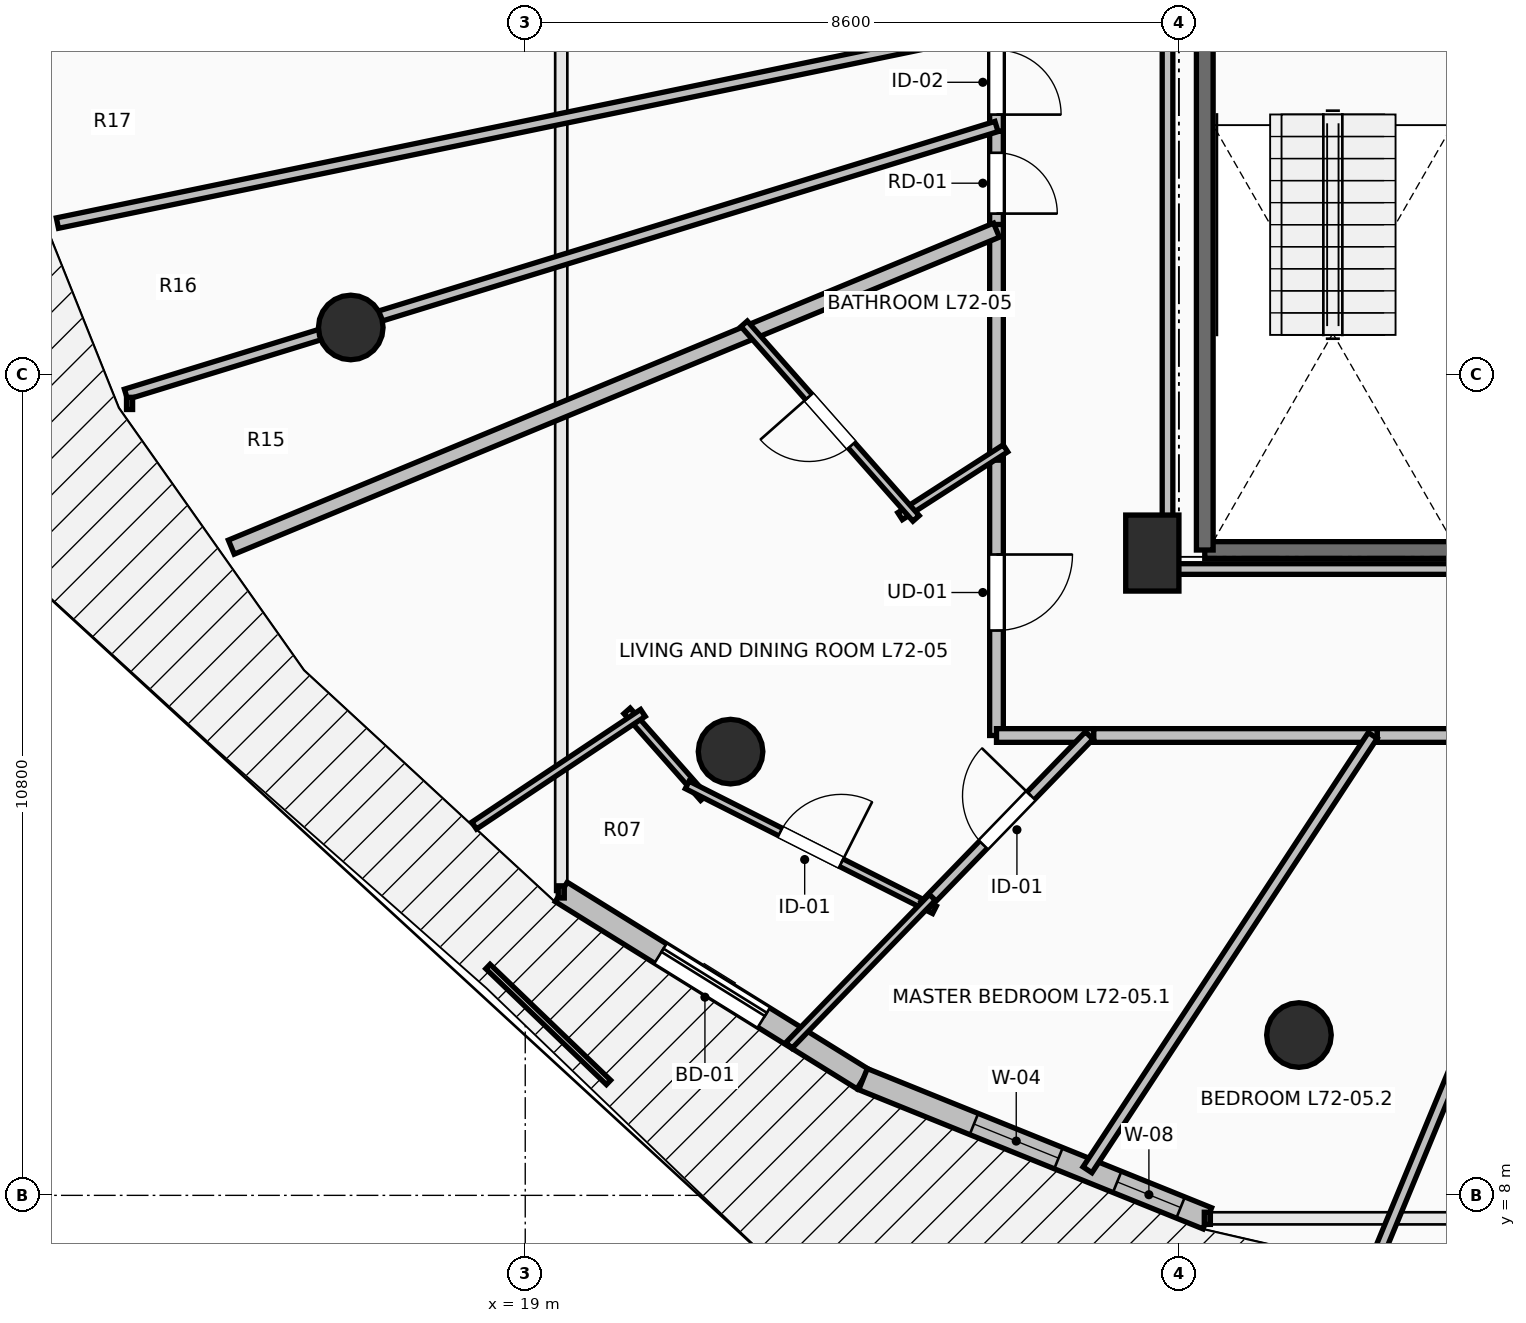
"""IFC4 building model, lengths in metres.
Left out: names, types, materials, properties, quantities, classifications, styles, units other than length and angle.
Written with IfcOpenShell. Run it as: python <this file> out.ifc"""

import sys

from ifc_helpers import new_model, si_unit, direction, frame, frame_2d, origin, origin_2d, place, context, subcontext, project, spatial, rectangle, circle, extrude, element, fill, save


model = new_model("IFC4")
c1 = context("Model", 3, precision=1e-05, world=origin(), true_north=direction((0.0, 1.0)))
c2 = subcontext(c1, "Body", "Model", "MODEL_VIEW")
j1 = project(units=[si_unit("LENGTHUNIT", "METRE"), si_unit("PLANEANGLEUNIT", "RADIAN")], contexts=[c1])
p1 = place(None, origin())
s1 = spatial("IfcSite", under=j1, at=p1, CompositionType="ELEMENT")
p2 = place(p1, origin())
s2 = spatial("IfcBuilding", under=s1, at=p2, CompositionType="ELEMENT")
p3 = place(p2, frame((0.0, 0.0, 266.2)))
s3 = spatial("IfcBuildingStorey", under=s2, at=p3, CompositionType="ELEMENT", Elevation=266.2)
for number, where, z_axis, x_axis in (
    (1, (16.705, 19.418, 0.0), (0.0, 0.0, 1.0), (-0.924, -0.383, 0.0)),
    (2, (21.701, 13.838, 0.0), (0.0, 0.0, 1.0), (-0.707, -0.707, 0.0)),
    (3, (29.179, 10.109, 0.0), (0.0, 0.0, 1.0), (-0.383, -0.924, 0.0)),
):
    element("IfcColumn", number, at=place(p3, frame(where, z_axis=z_axis, x_axis=x_axis)), inside=s3, PredefinedType="COLUMN", context=c2, shape_type="SweptSolid", body=[
        extrude(circle(Radius=0.425, at=origin_2d()), origin(), (0.0, 0.0, 1.0), 3.55),
    ])
p4 = place(p3, frame((27.25, 16.45, 0.0), z_axis=(0.0, 0.0, 1.0), x_axis=(1.0, 0.0, 0.0)))
e4 = element("IfcColumn", 4, at=p4, inside=s3, PredefinedType="PILASTER", context=c2, shape_type="SweptSolid", body=[
    extrude(rectangle(XDim=0.7, YDim=1.0, at=origin_2d()), origin(), (0.0, 0.0, 1.0), 3.55),
])
p5 = place(p3, frame((19.474, 11.992, 0.0), z_axis=(0.0, 0.0, 1.0), x_axis=(0.849702323036, -0.527262707032, 0.0)))
e5 = element("IfcWall", 5, at=p5, inside=s3, PredefinedType="STANDARD", context=c2, shape_type="SweptSolid", body=[
    extrude(rectangle(XDim=4.672, YDim=0.3, at=frame_2d((2.336, 0.0))), origin(), (0.0, 0.0, 1.0), 3.29),
])
p6 = place(p5, frame((1.536, 0.0, 0.0)))
e6 = element("IfcOpeningElement", 6, at=p6, cuts=e5, PredefinedType="OPENING", context=c2, shape_type="SweptSolid", body=[
    extrude(rectangle(XDim=1.6, YDim=2.3, at=frame_2d((0.8, 1.15))), frame((0.0, 0.165, 0.0), z_axis=(0.0, -1.0, 0.0), x_axis=(1.0, 0.0, 0.0)), (0.0, 0.0, 1.0), 0.33),
])
p7 = place(p3, frame((23.444, 9.529, 0.0), z_axis=(0.0, 0.0, 1.0), x_axis=(0.927147375511, -0.374696869594, 0.0)))
e7 = element("IfcWall", 7, at=p7, inside=s3, PredefinedType="STANDARD", context=c2, shape_type="SweptSolid", body=[
    extrude(rectangle(XDim=4.885, YDim=0.3, at=frame_2d((2.443, 0.0))), origin(), (0.0, 0.0, 1.0), 3.29),
])
p8 = place(p7, frame((1.574, 0.0, 0.85)))
e8 = element("IfcOpeningElement", 8, at=p8, cuts=e7, PredefinedType="OPENING", context=c2, shape_type="SweptSolid", body=[
    extrude(rectangle(XDim=1.2, YDim=1.95, at=frame_2d((0.6, 0.975))), frame((0.0, 0.165, 0.0), z_axis=(0.0, -1.0, 0.0), x_axis=(1.0, 0.0, 0.0)), (0.0, 0.0, 1.0), 0.33),
])
p9 = place(p7, frame((3.606, 0.0, 0.85)))
e9 = element("IfcOpeningElement", 9, at=p9, cuts=e7, PredefinedType="OPENING", context=c2, shape_type="SweptSolid", body=[
    extrude(rectangle(XDim=0.9, YDim=1.8, at=frame_2d((0.45, 0.9))), frame((0.0, 0.165, 0.0), z_axis=(0.0, -1.0, 0.0), x_axis=(1.0, 0.0, 0.0)), (0.0, 0.0, 1.0), 0.33),
])
p10 = place(p3, frame((31.31, 16.49, 0.0), z_axis=(0.0, 0.0, 1.0), x_axis=(-1.0, 0.0, 0.0)))
e10 = element("IfcWall", 10, at=p10, inside=s3, PredefinedType="SOLIDWALL", context=c2, shape_type="SweptSolid", body=[
    extrude(rectangle(XDim=3.37, YDim=0.22, at=frame_2d((1.685, 0.0))), origin(), (0.0, 0.0, 1.0), 3.29),
])
p11 = place(p3, frame((27.94, 16.49, 0.0), z_axis=(0.0, 0.0, 1.0), x_axis=(0.0, 1.0, 0.0)))
e11 = element("IfcWall", 11, at=p11, inside=s3, PredefinedType="SOLIDWALL", context=c2, shape_type="SweptSolid", body=[
    extrude(rectangle(XDim=7.42, YDim=0.22, at=frame_2d((3.71, 0.0))), origin(), (0.0, 0.0, 1.0), 3.29),
])
p12 = place(p3, frame((25.2, 23.288, 0.0), z_axis=(0.0, 0.0, 1.0), x_axis=(0.0, -1.0, 0.0)))
e12 = element("IfcWall", 12, at=p12, inside=s3, PredefinedType="PARTITIONING", context=c2, shape_type="SweptSolid", body=[
    extrude(rectangle(XDim=1.289, YDim=0.18, at=frame_2d((0.645, 0.0))), origin(), (0.0, 0.0, 1.0), 3.29),
])
p13 = place(p12, frame((0.219, 0.0, 0.0)))
e13 = element("IfcOpeningElement", 13, at=p13, cuts=e12, PredefinedType="OPENING", context=c2, shape_type="SweptSolid", body=[
    extrude(rectangle(XDim=0.85, YDim=2.1, at=frame_2d((0.425, 1.05))), frame((0.0, 0.105, 0.0), z_axis=(0.0, -1.0, 0.0), x_axis=(1.0, 0.0, 0.0)), (0.0, 0.0, 1.0), 0.21),
])
p14 = place(p3, frame((25.2, 21.999, 0.0), z_axis=(0.0, 0.0, 1.0), x_axis=(0.0, -1.0, 0.0)))
e14 = element("IfcWall", 14, at=p14, inside=s3, PredefinedType="PARTITIONING", context=c2, shape_type="SweptSolid", body=[
    extrude(rectangle(XDim=1.366, YDim=0.18, at=frame_2d((0.683, 0.0))), origin(), (0.0, 0.0, 1.0), 3.29),
])
p15 = place(p14, frame((0.283, 0.0, 0.0)))
e15 = element("IfcOpeningElement", 15, at=p15, cuts=e14, PredefinedType="OPENING", context=c2, shape_type="SweptSolid", body=[
    extrude(rectangle(XDim=0.8, YDim=2.05, at=frame_2d((0.4, 1.025))), frame((0.0, 0.105, 0.0), z_axis=(0.0, -1.0, 0.0), x_axis=(1.0, 0.0, 0.0)), (0.0, 0.0, 1.0), 0.21),
])
p16 = place(p3, frame((25.2, 17.812, 0.0), z_axis=(0.0, 0.0, 1.0), x_axis=(0.0, -1.0, 0.0)))
e16 = element("IfcWall", 16, at=p16, inside=s3, PredefinedType="PARTITIONING", context=c2, shape_type="SweptSolid", body=[
    extrude(rectangle(XDim=3.762, YDim=0.18, at=frame_2d((1.881, 0.0))), origin(), (0.0, 0.0, 1.0), 2.482),
])
p17 = place(p16, frame((1.381, 0.0, 0.0)))
e17 = element("IfcOpeningElement", 17, at=p17, cuts=e16, PredefinedType="OPENING", context=c2, shape_type="SweptSolid", body=[
    extrude(rectangle(XDim=1.0, YDim=2.15, at=frame_2d((0.5, 1.075))), frame((0.0, 0.105, 0.0), z_axis=(0.0, -1.0, 0.0), x_axis=(1.0, 0.0, 0.0)), (0.0, 0.0, 1.0), 0.21),
])
p18 = place(p3, frame((25.2, 14.05, 0.0), z_axis=(0.0, 0.0, 1.0), x_axis=(1.0, 0.0, 0.0)))
e18 = element("IfcWall", 18, at=p18, inside=s3, PredefinedType="PARTITIONING", context=c2, shape_type="SweptSolid", body=[
    extrude(rectangle(XDim=1.28, YDim=0.18, at=frame_2d((0.64, 0.0))), origin(), (0.0, 0.0, 1.0), 2.936),
])
p19 = place(p3, frame((25.2, 20.773, 0.0), z_axis=(0.0, 0.0, 1.0), x_axis=(0.0, -1.0, 0.0)))
e19 = element("IfcWall", 19, at=p19, inside=s3, PredefinedType="PARTITIONING", context=c2, shape_type="SweptSolid", body=[
    extrude(rectangle(XDim=3.101, YDim=0.18, at=frame_2d((1.55, 0.0))), origin(), (0.0, 0.0, 1.0), 3.29),
])
p20 = place(p3, frame((26.48, 14.05, 0.0), z_axis=(0.0, 0.0, 1.0), x_axis=(1.0, 0.0, 0.0)))
e20 = element("IfcWall", 20, at=p20, inside=s3, PredefinedType="PARTITIONING", context=c2, shape_type="SweptSolid", body=[
    extrude(rectangle(XDim=3.73, YDim=0.18, at=frame_2d((1.865, 0.0))), origin(), (0.0, 0.0, 1.0), 2.482),
])
p21 = place(p3, frame((30.21, 14.05, 0.0), z_axis=(0.0, 0.0, 1.0), x_axis=(1.0, 0.0, 0.0)))
e21 = element("IfcWall", 21, at=p21, inside=s3, PredefinedType="PARTITIONING", context=c2, shape_type="SweptSolid", body=[
    extrude(rectangle(XDim=2.9, YDim=0.18, at=frame_2d((1.45, 0.0))), origin(), (0.0, 0.0, 1.0), 2.979),
])
p22 = place(p21, frame((1.025, 0.0, 0.0)))
e22 = element("IfcOpeningElement", 22, at=p22, cuts=e21, PredefinedType="OPENING", context=c2, shape_type="SweptSolid", body=[
    extrude(rectangle(XDim=0.85, YDim=2.1, at=frame_2d((0.425, 1.05))), frame((0.0, 0.105, 0.0), z_axis=(0.0, -1.0, 0.0), x_axis=(1.0, 0.0, 0.0)), (0.0, 0.0, 1.0), 0.21),
])
p23 = place(p3, frame((12.845, 20.791, 0.0), z_axis=(0.0, 0.0, 1.0), x_axis=(0.97923049011, 0.202750208975, 0.0)))
e23 = element("IfcWall", 23, at=p23, inside=s3, PredefinedType="PARTITIONING", context=c2, shape_type="SweptSolid", body=[
    extrude(rectangle(XDim=12.617, YDim=0.14, at=frame_2d((6.309, 0.0))), origin(), (0.0, 0.0, 1.0), 2.874),
])
p24 = place(p3, frame((13.747, 18.539, 0.0), z_axis=(0.0, 0.0, 1.0), x_axis=(0.955802794564, 0.294008533725, 0.0)))
e24 = element("IfcWall", 24, at=p24, inside=s3, PredefinedType="PARTITIONING", context=c2, shape_type="SweptSolid", body=[
    extrude(rectangle(XDim=11.982, YDim=0.14, at=frame_2d((5.991, 0.0))), origin(), (0.0, 0.0, 1.0), 2.482),
])
p25 = place(p3, frame((15.133, 16.528, 0.0), z_axis=(0.0, 0.0, 1.0), x_axis=(0.923877013663, 0.382689513347, 0.0)))
e25 = element("IfcWall", 25, at=p25, inside=s3, PredefinedType="PARTITIONING", context=c2, shape_type="SweptSolid", body=[
    extrude(rectangle(XDim=10.896, YDim=0.2, at=frame_2d((5.448, 0.0))), origin(), (0.0, 0.0, 1.0), 2.482),
])
p26 = place(p3, frame((25.318, 17.828, 0.0), z_axis=(0.0, 0.0, 1.0), x_axis=(-0.840783734709, -0.541371140207, 0.0)))
e26 = element("IfcWall", 26, at=p26, inside=s3, PredefinedType="PARTITIONING", context=c2, shape_type="SweptSolid", body=[
    extrude(rectangle(XDim=1.649, YDim=0.11, at=frame_2d((0.824, 0.0))), origin(), (0.0, 0.0, 1.0), 2.482),
])
p27 = place(p3, frame((24.142, 16.906, 0.0), z_axis=(0.0, 0.0, 1.0), x_axis=(-0.662044708061, 0.749464345068, 0.0)))
e27 = element("IfcWall", 27, at=p27, inside=s3, PredefinedType="PARTITIONING", context=c2, shape_type="SweptSolid", body=[
    extrude(rectangle(XDim=3.416, YDim=0.11, at=frame_2d((1.708, 0.0))), origin(), (0.0, 0.0, 1.0), 2.482),
])
p28 = place(p27, frame((1.283, 0.0, 0.0)))
e28 = element("IfcOpeningElement", 28, at=p28, cuts=e27, PredefinedType="OPENING", context=c2, shape_type="SweptSolid", body=[
    extrude(rectangle(XDim=0.85, YDim=2.1, at=frame_2d((0.425, 1.05))), frame((0.0, 0.07, 0.0), z_axis=(0.0, -1.0, 0.0), x_axis=(1.0, 0.0, 0.0)), (0.0, 0.0, 1.0), 0.14),
])
p29 = place(p3, frame((20.339, 14.374, 0.0), z_axis=(0.0, 0.0, 1.0), x_axis=(0.662352602393, -0.749192251764, 0.0)))
e29 = element("IfcWall", 29, at=p29, inside=s3, PredefinedType="PARTITIONING", context=c2, shape_type="SweptSolid", body=[
    extrude(rectangle(XDim=1.524, YDim=0.11, at=frame_2d((0.762, 0.0))), origin(), (0.0, 0.0, 1.0), 3.29),
])
p30 = place(p3, frame((21.131, 13.4, 0.0), z_axis=(0.0, 0.0, 1.0), x_axis=(0.892570631547, -0.450907604394, 0.0)))
e30 = element("IfcWall", 30, at=p30, inside=s3, PredefinedType="PARTITIONING", context=c2, shape_type="SweptSolid", body=[
    extrude(rectangle(XDim=3.645, YDim=0.11, at=frame_2d((1.822, 0.0))), origin(), (0.0, 0.0, 1.0), 3.29),
])
p31 = place(p30, frame((1.372, 0.0, 0.0)))
e31 = element("IfcOpeningElement", 31, at=p31, cuts=e30, PredefinedType="OPENING", context=c2, shape_type="SweptSolid", body=[
    extrude(rectangle(XDim=0.9, YDim=2.1, at=frame_2d((0.45, 1.05))), frame((0.0, 0.07, 0.0), z_axis=(0.0, -1.0, 0.0), x_axis=(1.0, 0.0, 0.0)), (0.0, 0.0, 1.0), 0.14),
])
p32 = place(p3, frame((18.328, 12.864, 0.0), z_axis=(0.0, 0.0, 1.0), x_axis=(0.831712526046, 0.555206514748, 0.0)))
e32 = element("IfcWall", 32, at=p32, inside=s3, PredefinedType="PARTITIONING", context=c2, shape_type="SweptSolid", body=[
    extrude(rectangle(XDim=2.67, YDim=0.11, at=frame_2d((1.335, 0.0))), origin(), (0.0, 0.0, 1.0), 3.29),
])
p33 = place(p3, frame((24.259, 11.82, 0.0), z_axis=(0.0, 0.0, 1.0), x_axis=(0.695894072482, 0.718144442215, 0.0)))
e33 = element("IfcWall", 33, at=p33, inside=s3, PredefinedType="PARTITIONING", context=c2, shape_type="SweptSolid", body=[
    extrude(rectangle(XDim=3.105, YDim=0.14, at=frame_2d((1.553, 0.0))), origin(), (0.0, 0.0, 1.0), 2.874),
])
p34 = place(p33, frame((1.103, 0.0, 0.0)))
e34 = element("IfcOpeningElement", 34, at=p34, cuts=e33, PredefinedType="OPENING", context=c2, shape_type="SweptSolid", body=[
    extrude(rectangle(XDim=0.9, YDim=2.1, at=frame_2d((0.45, 1.05))), frame((0.0, 0.085, 0.0), z_axis=(0.0, -1.0, 0.0), x_axis=(1.0, 0.0, 0.0)), (0.0, 0.0, 1.0), 0.17),
])
p35 = place(p3, frame((22.469, 9.973, 0.0), z_axis=(0.0, 0.0, 1.0), x_axis=(0.695944713466, 0.718095366786, 0.0)))
e35 = element("IfcWall", 35, at=p35, inside=s3, PredefinedType="PARTITIONING", context=c2, shape_type="SweptSolid", body=[
    extrude(rectangle(XDim=2.711, YDim=0.11, at=frame_2d((1.356, 0.0))), origin(), (0.0, 0.0, 1.0), 3.29),
])
p36 = place(p3, frame((26.397, 8.336, 0.0), z_axis=(0.0, 0.0, 1.0), x_axis=(0.548967647923, 0.835843598728, 0.0)))
e36 = element("IfcWall", 36, at=p36, inside=s3, PredefinedType="PARTITIONING", context=c2, shape_type="SweptSolid", body=[
    extrude(rectangle(XDim=6.836, YDim=0.14, at=frame_2d((3.418, 0.0))), origin(), (0.0, 0.0, 1.0), 2.482),
])
p37 = place(p3, frame((27.45, 23.754, 0.0), z_axis=(0.0, 0.0, 1.0), x_axis=(0.0, -1.0, 0.0)))
e37 = element("IfcWall", 37, at=p37, inside=s3, PredefinedType="PARTITIONING", context=c2, shape_type="SweptSolid", body=[
    extrude(rectangle(XDim=7.514, YDim=0.14, at=frame_2d((3.757, 0.0))), origin(), (0.0, 0.0, 1.0), 2.482),
])
p38 = place(p3, frame((27.45, 16.24, 0.0), z_axis=(0.0, 0.0, 1.0), x_axis=(1.0, 0.0, 0.0)))
e38 = element("IfcWall", 38, at=p38, inside=s3, PredefinedType="PARTITIONING", context=c2, shape_type="SweptSolid", body=[
    extrude(rectangle(XDim=3.745, YDim=0.14, at=frame_2d((1.873, 0.0))), origin(), (0.0, 0.0, 1.0), 2.482),
])
p39 = place(p3, frame((30.207, 7.187, 0.0), z_axis=(0.0, 0.0, 1.0), x_axis=(0.382679691634, 0.923881081964, 0.0)))
e39 = element("IfcWall", 39, at=p39, inside=s3, PredefinedType="PARTITIONING", context=c2, shape_type="SweptSolid", body=[
    extrude(rectangle(XDim=7.168, YDim=0.14, at=frame_2d((3.584, 0.0))), origin(), (0.0, 0.0, 1.0), 2.874),
])
p40 = place(p6, origin())
e40 = element("IfcDoor", 40, at=p40, inside=s3, OperationType="SLIDING_TO_LEFT", PredefinedType="DOOR", context=c2, shape_type="SweptSolid", body=[
    extrude(rectangle(XDim=1.6, YDim=2.3, at=frame_2d((0.8, 1.15))), frame((0.0, 0.025, 0.0), z_axis=(0.0, -1.0, 0.0), x_axis=(1.0, 0.0, 0.0)), (0.0, 0.0, 1.0), 0.05),
])
fill(e6, e40)
p41 = place(p8, origin())
e41 = element("IfcWindow", 41, at=p41, inside=s3, PartitioningType="SINGLE_PANEL", PredefinedType="WINDOW", context=c2, shape_type="SweptSolid", body=[
    extrude(rectangle(XDim=1.2, YDim=1.95, at=frame_2d((0.6, 0.975))), frame((0.0, 0.03, 0.0), z_axis=(0.0, -1.0, 0.0), x_axis=(1.0, 0.0, 0.0)), (0.0, 0.0, 1.0), 0.06),
])
fill(e8, e41)
p42 = place(p9, origin())
e42 = element("IfcWindow", 42, at=p42, inside=s3, PartitioningType="SINGLE_PANEL", PredefinedType="WINDOW", context=c2, shape_type="SweptSolid", body=[
    extrude(rectangle(XDim=0.9, YDim=1.8, at=frame_2d((0.45, 0.9))), frame((0.0, 0.03, 0.0), z_axis=(0.0, -1.0, 0.0), x_axis=(1.0, 0.0, 0.0)), (0.0, 0.0, 1.0), 0.06),
])
fill(e9, e42)
p43 = place(p17, origin())
e43 = element("IfcDoor", 43, at=p43, inside=s3, OperationType="SINGLE_SWING_LEFT", PredefinedType="DOOR", context=c2, shape_type="SweptSolid", body=[
    extrude(rectangle(XDim=1.0, YDim=2.15, at=frame_2d((0.5, 1.075))), frame((0.0, 0.025, 0.0), z_axis=(0.0, -1.0, 0.0), x_axis=(1.0, 0.0, 0.0)), (0.0, 0.0, 1.0), 0.05),
])
fill(e17, e43)
p44 = place(p28, origin())
e44 = element("IfcDoor", 44, at=p44, inside=s3, OperationType="SINGLE_SWING_RIGHT", PredefinedType="DOOR", context=c2, shape_type="SweptSolid", body=[
    extrude(rectangle(XDim=0.85, YDim=2.1, at=frame_2d((0.425, 1.05))), frame((0.0, 0.025, 0.0), z_axis=(0.0, -1.0, 0.0), x_axis=(1.0, 0.0, 0.0)), (0.0, 0.0, 1.0), 0.05),
])
fill(e28, e44)
p45 = place(p31, origin())
e45 = element("IfcDoor", 45, at=p45, inside=s3, OperationType="SINGLE_SWING_RIGHT", PredefinedType="DOOR", context=c2, shape_type="SweptSolid", body=[
    extrude(rectangle(XDim=0.9, YDim=2.1, at=frame_2d((0.45, 1.05))), frame((0.0, 0.025, 0.0), z_axis=(0.0, -1.0, 0.0), x_axis=(1.0, 0.0, 0.0)), (0.0, 0.0, 1.0), 0.05),
])
fill(e31, e45)
p46 = place(p34, origin())
e46 = element("IfcDoor", 46, at=p46, inside=s3, OperationType="SINGLE_SWING_RIGHT", PredefinedType="DOOR", context=c2, shape_type="SweptSolid", body=[
    extrude(rectangle(XDim=0.9, YDim=2.1, at=frame_2d((0.45, 1.05))), frame((0.0, 0.025, 0.0), z_axis=(0.0, -1.0, 0.0), x_axis=(1.0, 0.0, 0.0)), (0.0, 0.0, 1.0), 0.05),
])
fill(e34, e46)
p47 = place(p13, origin())
e47 = element("IfcDoor", 47, at=p47, inside=s3, OperationType="SINGLE_SWING_RIGHT", PredefinedType="DOOR", context=c2, shape_type="SweptSolid", body=[
    extrude(rectangle(XDim=0.85, YDim=2.1, at=frame_2d((0.425, 1.05))), frame((0.0, 0.025, 0.0), z_axis=(0.0, -1.0, 0.0), x_axis=(1.0, 0.0, 0.0)), (0.0, 0.0, 1.0), 0.05),
])
fill(e13, e47)
p48 = place(p15, origin())
e48 = element("IfcDoor", 48, at=p48, inside=s3, OperationType="SINGLE_SWING_RIGHT", PredefinedType="DOOR", context=c2, shape_type="SweptSolid", body=[
    extrude(rectangle(XDim=0.8, YDim=2.05, at=frame_2d((0.4, 1.025))), frame((0.0, 0.025, 0.0), z_axis=(0.0, -1.0, 0.0), x_axis=(1.0, 0.0, 0.0)), (0.0, 0.0, 1.0), 0.05),
])
fill(e15, e48)
save(model, sys.argv[1])
